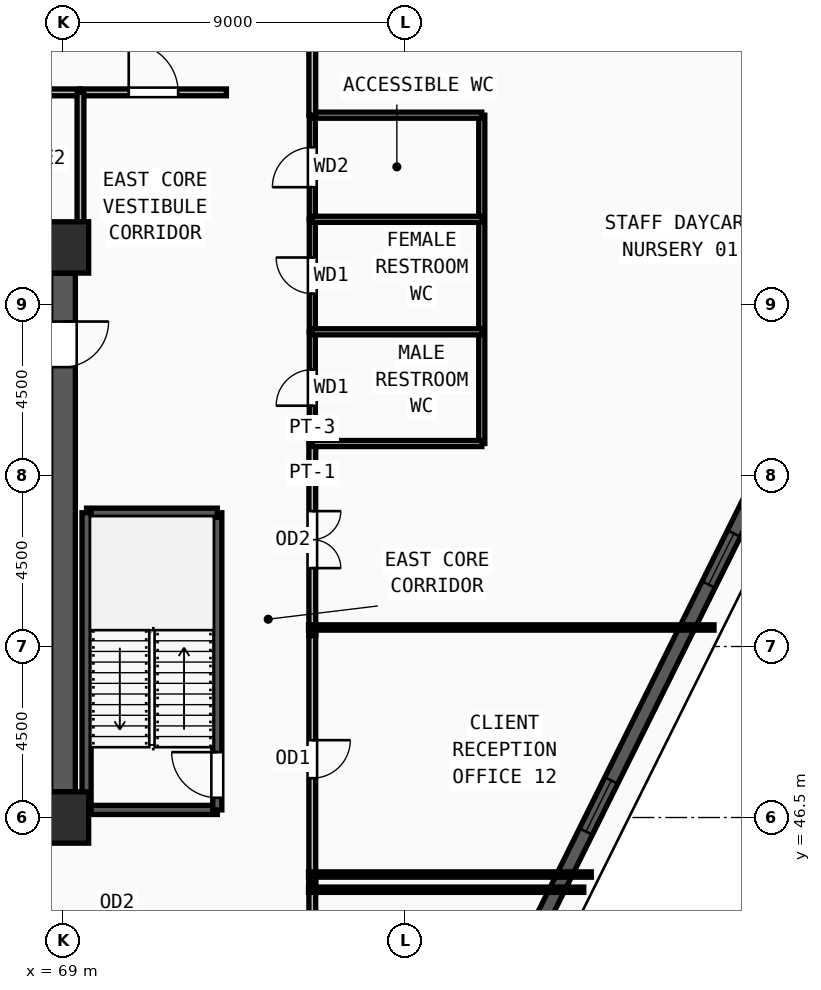
"""IFC4 building model, lengths in metres.
Left out: names, types, materials, properties, quantities, classifications, styles, units other than length and angle.
Written with IfcOpenShell. Run it as: python <this file> out.ifc"""

import sys

from ifc_helpers import new_model, si_unit, direction, frame, frame_2d, origin, origin_2d, place, context, subcontext, project, spatial, rectangle, extrude, source, transform, mapped, element, fill, save


model = new_model("IFC4")
c1 = context("Model", 3, precision=1e-05, world=origin(), true_north=direction((0.0, 1.0)))
c2 = subcontext(c1, "Body", "Model", "MODEL_VIEW")
j1 = project(units=[si_unit("LENGTHUNIT", "METRE"), si_unit("PLANEANGLEUNIT", "RADIAN")], contexts=[c1])
p1 = place(None, origin())
s1 = spatial("IfcSite", under=j1, at=p1, CompositionType="ELEMENT")
p2 = place(p1, origin())
s2 = spatial("IfcBuilding", under=s1, at=p2, CompositionType="ELEMENT")
p3 = place(p2, frame((0.0, 0.0, 224.25)))
s3 = spatial("IfcBuildingStorey", under=s2, at=p3, CompositionType="ELEMENT", Elevation=224.25)
m1 = source(origin(), c2, "Body", "SweptSolid", [
    extrude(rectangle(XDim=1.35, YDim=1.35, at=origin_2d()), origin(), (0.0, 0.0, 1.0), 3.75),
])
for number, where, z_axis, x_axis in (
    (1, (69.0, 46.5, 0.0), (0.0, 0.0, 1.0), (1.0, 0.0, 0.0)),
    (2, (69.0, 61.5, 0.0), (0.0, 0.0, 1.0), (1.0, 0.0, 0.0)),
):
    element("IfcColumn", number, at=place(p3, frame(where, z_axis=z_axis, x_axis=x_axis)), inside=s3, PredefinedType="COLUMN", context=c2, shape_type="MappedRepresentation", body=[
        mapped(m1, transform((0.0, 0.0, 0.0), x_axis=(1.0, 0.0, 0.0), y_axis=(0.0, 1.0, 0.0), z_axis=(0.0, 0.0, 1.0), scale=1.0)),
    ])
p4 = place(p3, frame((79.867, 40.305, 0.0), z_axis=(0.0, 0.0, 1.0), x_axis=(0.444873284972, 0.895593524049, 0.0)))
e3 = element("IfcWall", 3, at=p4, inside=s3, PredefinedType="SOLIDWALL", context=c2, shape_type="SweptSolid", body=[
    extrude(rectangle(XDim=29.02, YDim=0.38, at=frame_2d((14.51, 0.0))), origin(), (0.0, 0.0, 1.0), 3.57),
])
m2 = source(origin(), c2, "Body", "SweptSolid", [
    extrude(rectangle(XDim=1.5, YDim=1.9, at=frame_2d((0.75, 0.95))), frame((0.0, 0.2, 0.0), z_axis=(0.0, -1.0, 0.0), x_axis=(1.0, 0.0, 0.0)), (0.0, 0.0, 1.0), 0.4),
])
p5 = place(p4, frame((6.505, 0.0, 0.55)))
e4 = element("IfcOpeningElement", 4, at=p5, cuts=e3, PredefinedType="OPENING", context=c2, shape_type="MappedRepresentation", body=[
    mapped(m2, transform((0.0, 0.0, 0.0), x_axis=(1.0, 0.0, 0.0), y_axis=(0.0, 1.0, 0.0), z_axis=(0.0, 0.0, 1.0), scale=1.0)),
])
p6 = place(p4, frame((13.76, 0.0, 0.55)))
e5 = element("IfcOpeningElement", 5, at=p6, cuts=e3, PredefinedType="OPENING", context=c2, shape_type="MappedRepresentation", body=[
    mapped(m2, transform((0.0, 0.0, 0.0), x_axis=(1.0, 0.0, 0.0), y_axis=(0.0, 1.0, 0.0), z_axis=(0.0, 0.0, 1.0), scale=1.0)),
])
p7 = place(p4, frame((21.015, 0.0, 0.55)))
e6 = element("IfcOpeningElement", 6, at=p7, cuts=e3, PredefinedType="OPENING", context=c2, shape_type="MappedRepresentation", body=[
    mapped(m2, transform((0.0, 0.0, 0.0), x_axis=(1.0, 0.0, 0.0), y_axis=(0.0, 1.0, 0.0), z_axis=(0.0, 0.0, 1.0), scale=1.0)),
])
p8 = place(p3, frame((69.0, 60.825, 0.0), z_axis=(0.0, 0.0, 1.0), x_axis=(0.0, -1.0, 0.0)))
e7 = element("IfcWall", 7, at=p8, inside=s3, PredefinedType="SHEAR", context=c2, shape_type="SweptSolid", body=[
    extrude(rectangle(XDim=13.65, YDim=0.65, at=frame_2d((6.825, 0.0))), origin(), (0.0, 0.0, 1.0), 3.57),
])
m3 = source(origin(), c2, "Body", "SweptSolid", [
    extrude(rectangle(XDim=1.2, YDim=2.2, at=frame_2d((0.6, 1.1))), frame((0.0, 0.335, 0.0), z_axis=(0.0, -1.0, 0.0), x_axis=(1.0, 0.0, 0.0)), (0.0, 0.0, 1.0), 0.67),
])
p9 = place(p8, frame((1.275, 0.0, 0.0)))
e8 = element("IfcOpeningElement", 8, at=p9, cuts=e7, PredefinedType="OPENING", context=c2, shape_type="MappedRepresentation", body=[
    mapped(m3, transform((0.0, 0.0, 0.0), x_axis=(1.0, 0.0, 0.0), y_axis=(0.0, 1.0, 0.0), z_axis=(0.0, 0.0, 1.0), scale=1.0)),
])
p10 = place(p3, frame((69.62, 46.7, 0.0), z_axis=(0.0, 0.0, 1.0), x_axis=(1.0, 0.0, 0.0)))
e9 = element("IfcWall", 9, at=p10, inside=s3, PredefinedType="SOLIDWALL", context=c2, shape_type="SweptSolid", body=[
    extrude(rectangle(XDim=3.44, YDim=0.24, at=frame_2d((1.72, 0.0))), origin(), (0.0, 0.0, 1.0), 3.57),
])
p11 = place(p3, frame((73.06, 46.7, 0.0), z_axis=(0.0, 0.0, 1.0), x_axis=(0.0, 1.0, 0.0)))
e10 = element("IfcWall", 10, at=p11, inside=s3, PredefinedType="SOLIDWALL", context=c2, shape_type="SweptSolid", body=[
    extrude(rectangle(XDim=7.82, YDim=0.24, at=frame_2d((3.91, 0.0))), origin(), (0.0, 0.0, 1.0), 3.57),
])
m4 = source(origin(), c2, "Body", "SweptSolid", [
    extrude(rectangle(XDim=1.2, YDim=2.2, at=frame_2d((0.6, 1.1))), frame((0.0, 0.13, 0.0), z_axis=(0.0, -1.0, 0.0), x_axis=(1.0, 0.0, 0.0)), (0.0, 0.0, 1.0), 0.26),
])
p12 = place(p11, frame((0.32, 0.0, 0.0)))
e11 = element("IfcOpeningElement", 11, at=p12, cuts=e10, PredefinedType="OPENING", context=c2, shape_type="MappedRepresentation", body=[
    mapped(m4, transform((0.0, 0.0, 0.0), x_axis=(1.0, 0.0, 0.0), y_axis=(0.0, 1.0, 0.0), z_axis=(0.0, 0.0, 1.0), scale=1.0)),
])
p13 = place(p3, frame((73.06, 54.52, 0.0), z_axis=(0.0, 0.0, 1.0), x_axis=(-1.0, 0.0, 0.0)))
e12 = element("IfcWall", 12, at=p13, inside=s3, PredefinedType="SOLIDWALL", context=c2, shape_type="SweptSolid", body=[
    extrude(rectangle(XDim=3.44, YDim=0.24, at=frame_2d((1.72, 0.0))), origin(), (0.0, 0.0, 1.0), 3.57),
])
p14 = place(p3, frame((69.62, 54.52, 0.0), z_axis=(0.0, 0.0, 1.0), x_axis=(0.0, -1.0, 0.0)))
e13 = element("IfcWall", 13, at=p14, inside=s3, PredefinedType="SOLIDWALL", context=c2, shape_type="SweptSolid", body=[
    extrude(rectangle(XDim=7.82, YDim=0.24, at=frame_2d((3.91, 0.0))), origin(), (0.0, 0.0, 1.0), 3.57),
])
p15 = place(p3, frame((75.56, 56.34, 0.0), z_axis=(0.0, 0.0, 1.0), x_axis=(0.0, 1.0, 0.0)))
e14 = element("IfcWall", 14, at=p15, inside=s3, PredefinedType="PARTITIONING", context=c2, shape_type="SweptSolid", body=[
    extrude(rectangle(XDim=2.94, YDim=0.16, at=frame_2d((1.47, 0.0))), origin(), (0.0, 0.0, 1.0), 3.57),
])
m5 = source(origin(), c2, "Body", "SweptSolid", [
    extrude(rectangle(XDim=0.95, YDim=2.15, at=frame_2d((0.475, 1.075))), frame((0.0, 0.09, 0.0), z_axis=(0.0, -1.0, 0.0), x_axis=(1.0, 0.0, 0.0)), (0.0, 0.0, 1.0), 0.18),
])
p16 = place(p15, frame((0.995, 0.0, 0.0)))
e15 = element("IfcOpeningElement", 15, at=p16, cuts=e14, PredefinedType="OPENING", context=c2, shape_type="MappedRepresentation", body=[
    mapped(m5, transform((0.0, 0.0, 0.0), x_axis=(1.0, 0.0, 0.0), y_axis=(0.0, 1.0, 0.0), z_axis=(0.0, 0.0, 1.0), scale=1.0)),
])
p17 = place(p3, frame((75.56, 59.28, 0.0), z_axis=(0.0, 0.0, 1.0), x_axis=(0.0, 1.0, 0.0)))
e16 = element("IfcWall", 16, at=p17, inside=s3, PredefinedType="PARTITIONING", context=c2, shape_type="SweptSolid", body=[
    extrude(rectangle(XDim=2.96, YDim=0.16, at=frame_2d((1.48, 0.0))), origin(), (0.0, 0.0, 1.0), 3.57),
])
p18 = place(p17, frame((1.005, 0.0, 0.0)))
e17 = element("IfcOpeningElement", 17, at=p18, cuts=e16, PredefinedType="OPENING", context=c2, shape_type="MappedRepresentation", body=[
    mapped(m5, transform((0.0, 0.0, 0.0), x_axis=(1.0, 0.0, 0.0), y_axis=(0.0, 1.0, 0.0), z_axis=(0.0, 0.0, 1.0), scale=1.0)),
])
p19 = place(p3, frame((75.56, 62.24, 0.0), z_axis=(0.0, 0.0, 1.0), x_axis=(0.0, 1.0, 0.0)))
e18 = element("IfcWall", 18, at=p19, inside=s3, PredefinedType="PARTITIONING", context=c2, shape_type="SweptSolid", body=[
    extrude(rectangle(XDim=2.74, YDim=0.16, at=frame_2d((1.37, 0.0))), origin(), (0.0, 0.0, 1.0), 3.57),
])
m6 = source(origin(), c2, "Body", "SweptSolid", [
    extrude(rectangle(XDim=1.05, YDim=2.15, at=frame_2d((0.525, 1.075))), frame((0.0, 0.09, 0.0), z_axis=(0.0, -1.0, 0.0), x_axis=(1.0, 0.0, 0.0)), (0.0, 0.0, 1.0), 0.18),
])
p20 = place(p19, frame((0.845, 0.0, 0.0)))
e19 = element("IfcOpeningElement", 19, at=p20, cuts=e18, PredefinedType="OPENING", context=c2, shape_type="MappedRepresentation", body=[
    mapped(m6, transform((0.0, 0.0, 0.0), x_axis=(1.0, 0.0, 0.0), y_axis=(0.0, 1.0, 0.0), z_axis=(0.0, 0.0, 1.0), scale=1.0)),
])
p21 = place(p3, frame((65.92, 65.58, 0.0), z_axis=(0.0, 0.0, 1.0), x_axis=(1.0, 0.0, 0.0)))
e20 = element("IfcWall", 20, at=p21, inside=s3, PredefinedType="PARTITIONING", context=c2, shape_type="SweptSolid", body=[
    extrude(rectangle(XDim=3.54, YDim=0.18, at=frame_2d((1.77, 0.0))), origin(), (0.0, 0.0, 1.0), 3.57),
])
m7 = source(origin(), c2, "Body", "SweptSolid", [
    extrude(rectangle(XDim=1.0, YDim=2.2, at=frame_2d((0.5, 1.1))), frame((0.0, 0.1, 0.0), z_axis=(0.0, -1.0, 0.0), x_axis=(1.0, 0.0, 0.0)), (0.0, 0.0, 1.0), 0.2),
])
p22 = place(p21, frame((1.27, 0.0, 0.0)))
e21 = element("IfcOpeningElement", 21, at=p22, cuts=e20, PredefinedType="OPENING", context=c2, shape_type="MappedRepresentation", body=[
    mapped(m7, transform((0.0, 0.0, 0.0), x_axis=(1.0, 0.0, 0.0), y_axis=(0.0, 1.0, 0.0), z_axis=(0.0, 0.0, 1.0), scale=1.0)),
])
p23 = place(p3, frame((69.46, 65.58, 0.0), z_axis=(0.0, 0.0, 1.0), x_axis=(1.0, 0.0, 0.0)))
e22 = element("IfcWall", 22, at=p23, inside=s3, PredefinedType="PARTITIONING", context=c2, shape_type="SweptSolid", body=[
    extrude(rectangle(XDim=3.84, YDim=0.18, at=frame_2d((1.92, 0.0))), origin(), (0.0, 0.0, 1.0), 3.57),
])
m8 = source(origin(), c2, "Body", "SweptSolid", [
    extrude(rectangle(XDim=1.3, YDim=2.2, at=frame_2d((0.65, 1.1))), frame((0.0, 0.1, 0.0), z_axis=(0.0, -1.0, 0.0), x_axis=(1.0, 0.0, 0.0)), (0.0, 0.0, 1.0), 0.2),
])
p24 = place(p23, frame((1.27, 0.0, 0.0)))
e23 = element("IfcOpeningElement", 23, at=p24, cuts=e22, PredefinedType="OPENING", context=c2, shape_type="MappedRepresentation", body=[
    mapped(m8, transform((0.0, 0.0, 0.0), x_axis=(1.0, 0.0, 0.0), y_axis=(0.0, 1.0, 0.0), z_axis=(0.0, 0.0, 1.0), scale=1.0)),
])
p25 = place(p3, frame((75.56, 56.34, 0.0), z_axis=(0.0, 0.0, 1.0), x_axis=(0.0, -1.0, 0.0)))
e24 = element("IfcWall", 24, at=p25, inside=s3, PredefinedType="PARTITIONING", context=c2, shape_type="SweptSolid", body=[
    extrude(rectangle(XDim=5.055, YDim=0.18, at=frame_2d((2.528, 0.0))), origin(), (0.0, 0.0, 1.0), 3.57),
])
m9 = source(origin(), c2, "Body", "SweptSolid", [
    extrude(rectangle(XDim=1.5, YDim=2.2, at=frame_2d((0.75, 1.1))), frame((0.0, 0.1, 0.0), z_axis=(0.0, -1.0, 0.0), x_axis=(1.0, 0.0, 0.0)), (0.0, 0.0, 1.0), 0.2),
])
p26 = place(p25, frame((1.778, 0.0, 0.0)))
e25 = element("IfcOpeningElement", 25, at=p26, cuts=e24, PredefinedType="OPENING", context=c2, shape_type="MappedRepresentation", body=[
    mapped(m9, transform((0.0, 0.0, 0.0), x_axis=(1.0, 0.0, 0.0), y_axis=(0.0, 1.0, 0.0), z_axis=(0.0, 0.0, 1.0), scale=1.0)),
])
p27 = place(p3, frame((75.56, 51.285, 0.0), z_axis=(0.0, 0.0, 1.0), x_axis=(0.0, -1.0, 0.0)))
e26 = element("IfcWall", 26, at=p27, inside=s3, PredefinedType="PARTITIONING", context=c2, shape_type="SweptSolid", body=[
    extrude(rectangle(XDim=6.5, YDim=0.18, at=frame_2d((3.25, 0.0))), origin(), (0.0, 0.0, 1.0), 3.57),
])
p28 = place(p27, frame((2.75, 0.0, 0.0)))
e27 = element("IfcOpeningElement", 27, at=p28, cuts=e26, PredefinedType="OPENING", context=c2, shape_type="MappedRepresentation", body=[
    mapped(m7, transform((0.0, 0.0, 0.0), x_axis=(1.0, 0.0, 0.0), y_axis=(0.0, 1.0, 0.0), z_axis=(0.0, 0.0, 1.0), scale=1.0)),
])
p29 = place(p3, frame((80.02, 56.34, 0.0), z_axis=(0.0, 0.0, 1.0), x_axis=(0.0, 1.0, 0.0)))
e28 = element("IfcWall", 28, at=p29, inside=s3, PredefinedType="PARTITIONING", context=c2, shape_type="SweptSolid", body=[
    extrude(rectangle(XDim=8.64, YDim=0.16, at=frame_2d((4.32, 0.0))), origin(), (0.0, 0.0, 1.0), 3.57),
])
for number, where, z_axis, x_axis in (
    (29, (75.56, 56.34, 0.0), (0.0, 0.0, 1.0), (1.0, 0.0, 0.0)),
    (30, (75.56, 59.28, 0.0), (0.0, 0.0, 1.0), (1.0, 0.0, 0.0)),
    (31, (75.56, 62.24, 0.0), (0.0, 0.0, 1.0), (1.0, 0.0, 0.0)),
    (32, (75.56, 64.98, 0.0), (0.0, 0.0, 1.0), (1.0, 0.0, 0.0)),
):
    element("IfcWall", number, at=place(p3, frame(where, z_axis=z_axis, x_axis=x_axis)), inside=s3, PredefinedType="PARTITIONING", context=c2, shape_type="SweptSolid", body=[
        extrude(rectangle(XDim=4.46, YDim=0.16, at=frame_2d((2.23, 0.0))), origin(), (0.0, 0.0, 1.0), 3.57),
    ])
p30 = place(p3, frame((69.46, 61.95, 0.0), z_axis=(0.0, 0.0, 1.0), x_axis=(0.0, 1.0, 0.0)))
e33 = element("IfcWall", 33, at=p30, inside=s3, PredefinedType="PARTITIONING", context=c2, shape_type="SweptSolid", body=[
    extrude(rectangle(XDim=3.63, YDim=0.18, at=frame_2d((1.815, 0.0))), origin(), (0.0, 0.0, 1.0), 3.57),
])
p31 = place(p3, frame((75.56, 67.215, 0.0), z_axis=(0.0, 0.0, 1.0), x_axis=(0.0, -1.0, 0.0)))
e34 = element("IfcWall", 34, at=p31, inside=s3, PredefinedType="PARTITIONING", context=c2, shape_type="SweptSolid", body=[
    extrude(rectangle(XDim=2.235, YDim=0.18, at=frame_2d((1.118, 0.0))), origin(), (0.0, 0.0, 1.0), 3.57),
])
p32 = place(p3, frame((75.56, 44.785, 0.0), z_axis=(0.0, 0.0, 1.0), x_axis=(0.0, -1.0, 0.0)))
e35 = element("IfcWall", 35, at=p32, inside=s3, PredefinedType="PARTITIONING", context=c2, shape_type="SweptSolid", body=[
    extrude(rectangle(XDim=1.115, YDim=0.18, at=frame_2d((0.558, 0.0))), origin(), (0.0, 0.0, 1.0), 3.57),
])
p33 = place(p3, frame((75.46, 44.6, 0.0), z_axis=(0.0, 0.0, 1.0), x_axis=(1.0, 0.0, 0.0)))
e36 = element("IfcWall", 36, at=p33, inside=s3, PredefinedType="PARTITIONING", context=c2, shape_type="SweptSolid", body=[
    extrude(rectangle(XDim=7.244, YDim=0.14, at=frame_2d((3.622, 0.0))), origin(), (0.0, 0.0, 1.0), 3.57),
])
p34 = place(p3, frame((75.46, 45.0, 0.0), z_axis=(0.0, 0.0, 1.0), x_axis=(1.0, 0.0, 0.0)))
e37 = element("IfcWall", 37, at=p34, inside=s3, PredefinedType="PARTITIONING", context=c2, shape_type="SweptSolid", body=[
    extrude(rectangle(XDim=7.442, YDim=0.14, at=frame_2d((3.721, 0.0))), origin(), (0.0, 0.0, 1.0), 3.57),
])
p35 = place(p3, frame((75.46, 51.5, 0.0), z_axis=(0.0, 0.0, 1.0), x_axis=(1.0, 0.0, 0.0)))
e38 = element("IfcWall", 38, at=p35, inside=s3, PredefinedType="PARTITIONING", context=c2, shape_type="SweptSolid", body=[
    extrude(rectangle(XDim=10.671, YDim=0.14, at=frame_2d((5.335, 0.0))), origin(), (0.0, 0.0, 1.0), 3.57),
])
m10 = source(origin(), c2, "Body", "SweptSolid", [
    extrude(rectangle(XDim=1.5, YDim=1.9, at=frame_2d((0.75, 0.95))), frame((0.0, 0.03, 0.0), z_axis=(0.0, -1.0, 0.0), x_axis=(1.0, 0.0, 0.0)), (0.0, 0.0, 1.0), 0.06),
])
p36 = place(p5, origin())
e39 = element("IfcWindow", 39, at=p36, inside=s3, PartitioningType="DOUBLE_PANEL_VERTICAL", PredefinedType="WINDOW", context=c2, shape_type="MappedRepresentation", body=[
    mapped(m10, transform((0.0, 0.0, 0.0), x_axis=(1.0, 0.0, 0.0), y_axis=(0.0, 1.0, 0.0), z_axis=(0.0, 0.0, 1.0), scale=1.0)),
])
fill(e4, e39)
p37 = place(p6, origin())
e40 = element("IfcWindow", 40, at=p37, inside=s3, PartitioningType="DOUBLE_PANEL_VERTICAL", PredefinedType="WINDOW", context=c2, shape_type="MappedRepresentation", body=[
    mapped(m10, transform((0.0, 0.0, 0.0), x_axis=(1.0, 0.0, 0.0), y_axis=(0.0, 1.0, 0.0), z_axis=(0.0, 0.0, 1.0), scale=1.0)),
])
fill(e5, e40)
m11 = source(origin(), c2, "Body", "SweptSolid", [
    extrude(rectangle(XDim=1.2, YDim=2.2, at=frame_2d((0.6, 1.1))), frame((0.0, 0.025, 0.0), z_axis=(0.0, -1.0, 0.0), x_axis=(1.0, 0.0, 0.0)), (0.0, 0.0, 1.0), 0.05),
])
p38 = place(p9, origin())
e41 = element("IfcDoor", 41, at=p38, inside=s3, OperationType="SINGLE_SWING_LEFT", PredefinedType="DOOR", context=c2, shape_type="MappedRepresentation", body=[
    mapped(m11, transform((0.0, 0.0, 0.0), x_axis=(1.0, 0.0, 0.0), y_axis=(0.0, 1.0, 0.0), z_axis=(0.0, 0.0, 1.0), scale=1.0)),
])
fill(e8, e41)
p39 = place(p12, origin())
e42 = element("IfcDoor", 42, at=p39, inside=s3, OperationType="SINGLE_SWING_RIGHT", PredefinedType="DOOR", context=c2, shape_type="MappedRepresentation", body=[
    mapped(m11, transform((0.0, 0.0, 0.0), x_axis=(1.0, 0.0, 0.0), y_axis=(0.0, 1.0, 0.0), z_axis=(0.0, 0.0, 1.0), scale=1.0)),
])
fill(e11, e42)
m12 = source(origin(), c2, "Body", "SweptSolid", [
    extrude(rectangle(XDim=0.95, YDim=2.15, at=frame_2d((0.475, 1.075))), frame((0.0, 0.025, 0.0), z_axis=(0.0, -1.0, 0.0), x_axis=(1.0, 0.0, 0.0)), (0.0, 0.0, 1.0), 0.05),
])
p40 = place(p16, origin())
e43 = element("IfcDoor", 43, at=p40, inside=s3, OperationType="SINGLE_SWING_LEFT", PredefinedType="DOOR", context=c2, shape_type="MappedRepresentation", body=[
    mapped(m12, transform((0.0, 0.0, 0.0), x_axis=(1.0, 0.0, 0.0), y_axis=(0.0, 1.0, 0.0), z_axis=(0.0, 0.0, 1.0), scale=1.0)),
])
fill(e15, e43)
p41 = place(p18, origin())
e44 = element("IfcDoor", 44, at=p41, inside=s3, OperationType="SINGLE_SWING_RIGHT", PredefinedType="DOOR", context=c2, shape_type="MappedRepresentation", body=[
    mapped(m12, transform((0.0, 0.0, 0.0), x_axis=(1.0, 0.0, 0.0), y_axis=(0.0, 1.0, 0.0), z_axis=(0.0, 0.0, 1.0), scale=1.0)),
])
fill(e17, e44)
m13 = source(origin(), c2, "Body", "SweptSolid", [
    extrude(rectangle(XDim=1.05, YDim=2.15, at=frame_2d((0.525, 1.075))), frame((0.0, 0.025, 0.0), z_axis=(0.0, -1.0, 0.0), x_axis=(1.0, 0.0, 0.0)), (0.0, 0.0, 1.0), 0.05),
])
p42 = place(p20, origin())
e45 = element("IfcDoor", 45, at=p42, inside=s3, OperationType="SINGLE_SWING_LEFT", PredefinedType="DOOR", context=c2, shape_type="MappedRepresentation", body=[
    mapped(m13, transform((0.0, 0.0, 0.0), x_axis=(1.0, 0.0, 0.0), y_axis=(0.0, 1.0, 0.0), z_axis=(0.0, 0.0, 1.0), scale=1.0)),
])
fill(e19, e45)
m14 = source(origin(), c2, "Body", "SweptSolid", [
    extrude(rectangle(XDim=1.3, YDim=2.2, at=frame_2d((0.65, 1.1))), frame((0.0, 0.025, 0.0), z_axis=(0.0, -1.0, 0.0), x_axis=(1.0, 0.0, 0.0)), (0.0, 0.0, 1.0), 0.05),
])
p43 = place(p24, origin())
e46 = element("IfcDoor", 46, at=p43, inside=s3, OperationType="SINGLE_SWING_LEFT", PredefinedType="DOOR", context=c2, shape_type="MappedRepresentation", body=[
    mapped(m14, transform((0.0, 0.0, 0.0), x_axis=(1.0, 0.0, 0.0), y_axis=(0.0, 1.0, 0.0), z_axis=(0.0, 0.0, 1.0), scale=1.0)),
])
fill(e23, e46)
m15 = source(origin(), c2, "Body", "SweptSolid", [
    extrude(rectangle(XDim=1.5, YDim=2.2, at=frame_2d((0.75, 1.1))), frame((0.0, 0.025, 0.0), z_axis=(0.0, -1.0, 0.0), x_axis=(1.0, 0.0, 0.0)), (0.0, 0.0, 1.0), 0.05),
])
p44 = place(p26, origin())
e47 = element("IfcDoor", 47, at=p44, inside=s3, OperationType="DOUBLE_DOOR_SINGLE_SWING", PredefinedType="DOOR", context=c2, shape_type="MappedRepresentation", body=[
    mapped(m15, transform((0.0, 0.0, 0.0), x_axis=(1.0, 0.0, 0.0), y_axis=(0.0, 1.0, 0.0), z_axis=(0.0, 0.0, 1.0), scale=1.0)),
])
fill(e25, e47)
m16 = source(origin(), c2, "Body", "SweptSolid", [
    extrude(rectangle(XDim=1.0, YDim=2.2, at=frame_2d((0.5, 1.1))), frame((0.0, 0.025, 0.0), z_axis=(0.0, -1.0, 0.0), x_axis=(1.0, 0.0, 0.0)), (0.0, 0.0, 1.0), 0.05),
])
p45 = place(p28, origin())
e48 = element("IfcDoor", 48, at=p45, inside=s3, OperationType="SINGLE_SWING_LEFT", PredefinedType="DOOR", context=c2, shape_type="MappedRepresentation", body=[
    mapped(m16, transform((0.0, 0.0, 0.0), x_axis=(1.0, 0.0, 0.0), y_axis=(0.0, 1.0, 0.0), z_axis=(0.0, 0.0, 1.0), scale=1.0)),
])
fill(e27, e48)
save(model, sys.argv[1])
